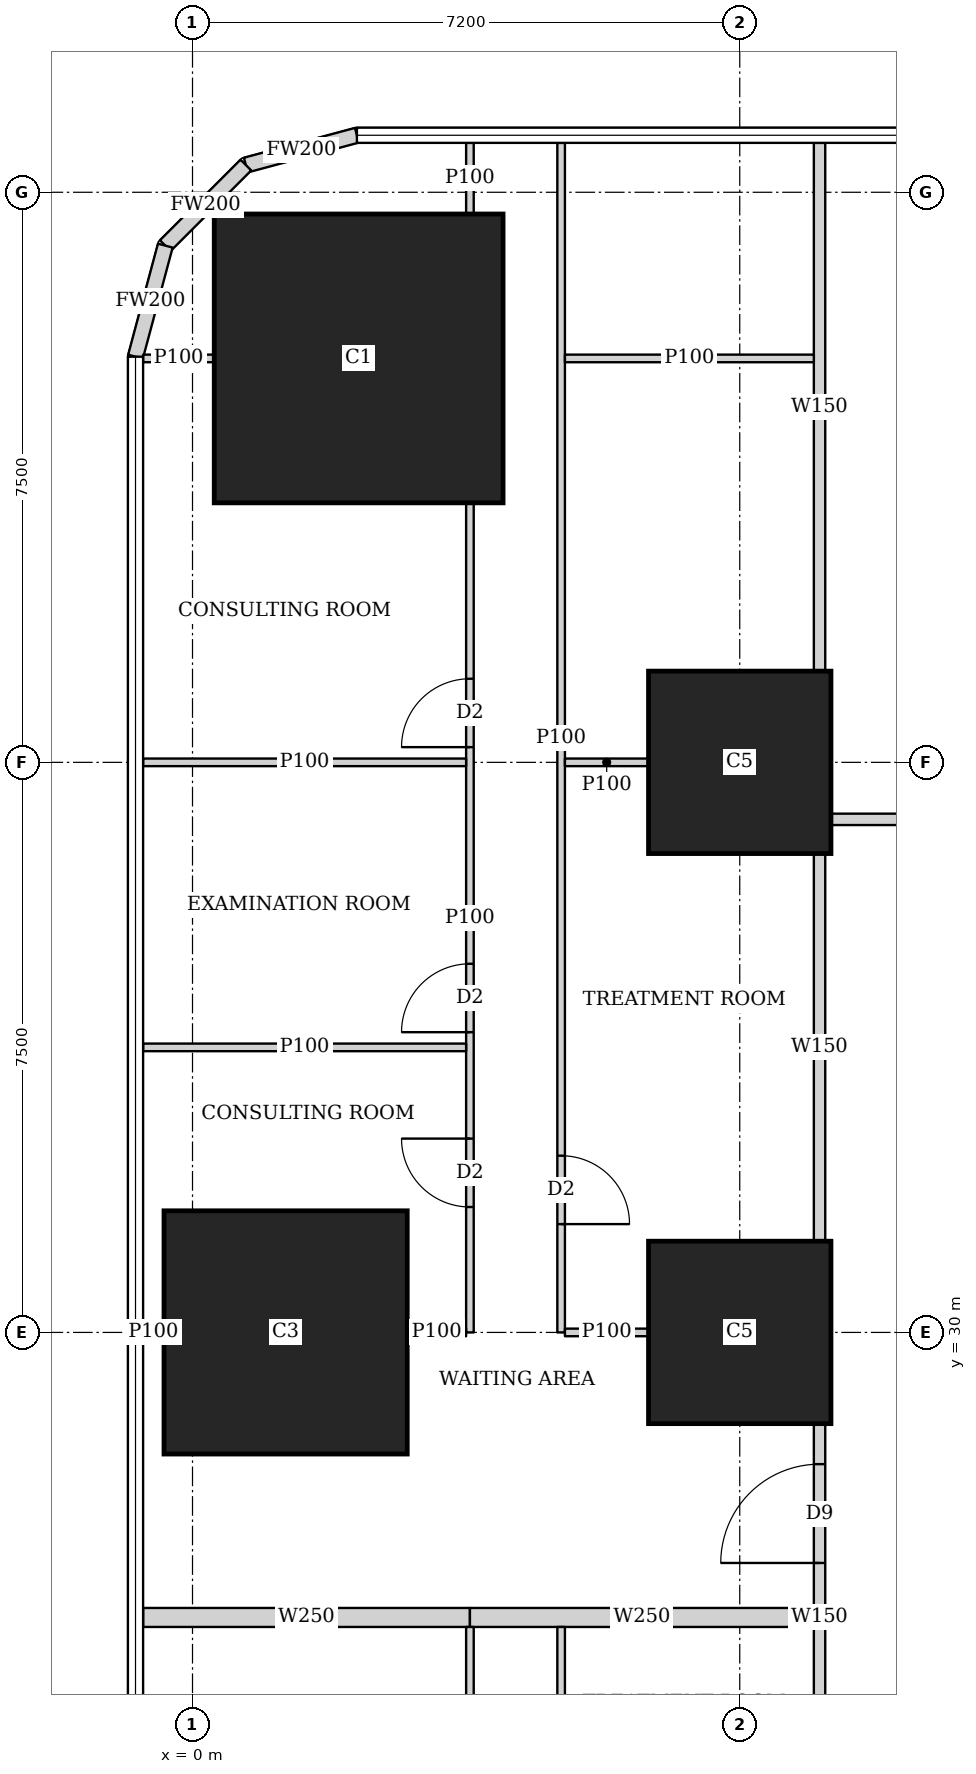
"""IFC4 building model, lengths in metres.
Left out: names, types, materials, properties, quantities, classifications, styles, units other than length and angle.
Written with IfcOpenShell. Run it as: python <this file> out.ifc"""

import sys

from ifc_helpers import new_model, si_unit, direction, frame, frame_2d, origin, origin_2d, place, context, subcontext, project, spatial, rectangle, extrude, element, fill, save


model = new_model("IFC4")
c1 = context("Model", 3, precision=1e-05, world=origin(), true_north=direction((0.0, 1.0)))
c2 = subcontext(c1, "Body", "Model", "MODEL_VIEW")
j1 = project(units=[si_unit("LENGTHUNIT", "METRE"), si_unit("PLANEANGLEUNIT", "RADIAN")], contexts=[c1])
p1 = place(None, origin())
s1 = spatial("IfcSite", under=j1, at=p1, CompositionType="ELEMENT")
p2 = place(p1, origin())
s2 = spatial("IfcBuilding", under=s1, at=p2, CompositionType="ELEMENT")
p3 = place(p2, frame((0.0, 0.0, 5.6)))
s3 = spatial("IfcBuildingStorey", under=s2, at=p3, CompositionType="ELEMENT", Elevation=5.6)
p4 = place(p3, frame((1.225, 30.0, 0.0), z_axis=(0.0, 0.0, 1.0), x_axis=(1.0, 0.0, 0.0)))
e1 = element("IfcColumn", 1, at=p4, inside=s3, PredefinedType="COLUMN", context=c2, shape_type="SweptSolid", body=[
    extrude(rectangle(XDim=3.2, YDim=3.2, at=origin_2d()), origin(), (0.0, 0.0, 1.0), 4.5),
])
for number, where, z_axis, x_axis in (
    (2, (7.2, 30.0, 0.0), (0.0, 0.0, 1.0), (1.0, 0.0, 0.0)),
    (3, (7.2, 37.5, 0.0), (0.0, 0.0, 1.0), (1.0, 0.0, 0.0)),
):
    element("IfcColumn", number, at=place(p3, frame(where, z_axis=z_axis, x_axis=x_axis)), inside=s3, PredefinedType="COLUMN", context=c2, shape_type="SweptSolid", body=[
        extrude(rectangle(XDim=2.4, YDim=2.4, at=origin_2d()), origin(), (0.0, 0.0, 1.0), 4.5),
    ])
p5 = place(p3, frame((2.186, 42.814, 0.0), z_axis=(0.0, 0.0, 1.0), x_axis=(1.0, 0.0, 0.0)))
e4 = element("IfcColumn", 4, at=p5, inside=s3, PredefinedType="COLUMN", context=c2, shape_type="SweptSolid", body=[
    extrude(rectangle(XDim=3.8, YDim=3.8, at=origin_2d()), origin(), (0.0, 0.0, 1.0), 4.5),
])
p6 = place(p3, frame((2.163, 45.75, 0.0), z_axis=(0.0, 0.0, 1.0), x_axis=(-0.965832000415, -0.259168954497, 0.0)))
e5 = element("IfcWall", 5, at=p6, inside=s3, PredefinedType="SOLIDWALL", context=c2, shape_type="SweptSolid", body=[
    extrude(rectangle(XDim=1.513, YDim=0.2, at=frame_2d((0.756, 0.0))), origin(), (0.0, 0.0, 1.0), 4.2),
])
p7 = place(p3, frame((0.702, 45.358, 0.0), z_axis=(0.0, 0.0, 1.0), x_axis=(-0.707106781187, -0.707106781187, 0.0)))
e6 = element("IfcWall", 6, at=p7, inside=s3, PredefinedType="SOLIDWALL", context=c2, shape_type="SweptSolid", body=[
    extrude(rectangle(XDim=1.499, YDim=0.2, at=frame_2d((0.75, 0.0))), origin(), (0.0, 0.0, 1.0), 4.2),
])
p8 = place(p3, frame((-0.358, 44.298, 0.0), z_axis=(0.0, 0.0, 1.0), x_axis=(-0.259168954497, -0.965832000415, 0.0)))
e7 = element("IfcWall", 7, at=p8, inside=s3, PredefinedType="SOLIDWALL", context=c2, shape_type="SweptSolid", body=[
    extrude(rectangle(XDim=1.513, YDim=0.2, at=frame_2d((0.756, 0.0))), origin(), (0.0, 0.0, 1.0), 4.2),
])
p9 = place(p3, frame((8.25, 23.701, 0.0), z_axis=(0.0, 0.0, 1.0), x_axis=(0.0, 1.0, 0.0)))
e8 = element("IfcWall", 8, at=p9, inside=s3, PredefinedType="SOLIDWALL", context=c2, shape_type="SweptSolid", body=[
    extrude(rectangle(XDim=5.098, YDim=0.15, at=frame_2d((2.549, 0.0))), origin(), (0.0, 0.0, 1.0), 4.2),
])
p10 = place(p9, frame((3.266, 0.0, 0.0)))
e9 = element("IfcOpeningElement", 9, at=p10, cuts=e8, PredefinedType="OPENING", context=c2, shape_type="SweptSolid", body=[
    extrude(rectangle(XDim=1.3, YDim=2.1, at=frame_2d((0.65, 1.05))), frame((0.0, 0.085, 0.0), z_axis=(0.0, -1.0, 0.0), x_axis=(1.0, 0.0, 0.0)), (0.0, 0.0, 1.0), 0.17),
])
p11 = place(p3, frame((8.25, 31.201, 0.0), z_axis=(0.0, 0.0, 1.0), x_axis=(0.0, 1.0, 0.0)))
e10 = element("IfcWall", 10, at=p11, inside=s3, PredefinedType="SOLIDWALL", context=c2, shape_type="SweptSolid", body=[
    extrude(rectangle(XDim=5.098, YDim=0.15, at=frame_2d((2.549, 0.0))), origin(), (0.0, 0.0, 1.0), 4.2),
])
p12 = place(p3, frame((8.25, 38.701, 0.0), z_axis=(0.0, 0.0, 1.0), x_axis=(0.0, 1.0, 0.0)))
e11 = element("IfcWall", 11, at=p12, inside=s3, PredefinedType="SOLIDWALL", context=c2, shape_type="SweptSolid", body=[
    extrude(rectangle(XDim=6.949, YDim=0.15, at=frame_2d((3.475, 0.0))), origin(), (0.0, 0.0, 1.0), 2.4),
])
p13 = place(p3, frame((8.401, 36.75, 0.0), z_axis=(0.0, 0.0, 1.0), x_axis=(1.0, 0.0, 0.0)))
e12 = element("IfcWall", 12, at=p13, inside=s3, PredefinedType="SOLIDWALL", context=c2, shape_type="SweptSolid", body=[
    extrude(rectangle(XDim=4.798, YDim=0.15, at=frame_2d((2.399, 0.0))), origin(), (0.0, 0.0, 1.0), 2.6),
])
p14 = place(p13, frame((2.274, 0.0, 0.0)))
e13 = element("IfcOpeningElement", 13, at=p14, cuts=e12, PredefinedType="OPENING", context=c2, shape_type="SweptSolid", body=[
    extrude(rectangle(XDim=1.3, YDim=2.1, at=frame_2d((0.65, 1.05))), frame((0.0, 0.085, 0.0), z_axis=(0.0, -1.0, 0.0), x_axis=(1.0, 0.0, 0.0)), (0.0, 0.0, 1.0), 0.17),
])
p15 = place(p3, frame((3.65, 15.0, 0.0), z_axis=(0.0, 0.0, 1.0), x_axis=(0.0, 1.0, 0.0)))
e14 = element("IfcWall", 14, at=p15, inside=s3, PredefinedType="PARTITIONING", context=c2, shape_type="SweptSolid", body=[
    extrude(rectangle(XDim=11.125, YDim=0.1, at=frame_2d((5.562, 0.0))), origin(), (0.0, 0.0, 1.0), 2.6),
])
p16 = place(p15, frame((1.65, 0.0, 0.0)))
e15 = element("IfcOpeningElement", 15, at=p16, cuts=e14, PredefinedType="OPENING", context=c2, shape_type="SweptSolid", body=[
    extrude(rectangle(XDim=0.9, YDim=2.1, at=frame_2d((0.45, 1.05))), frame((0.0, 0.06, 0.0), z_axis=(0.0, -1.0, 0.0), x_axis=(1.0, 0.0, 0.0)), (0.0, 0.0, 1.0), 0.12),
])
p17 = place(p15, frame((3.95, 0.0, 0.0)))
e16 = element("IfcOpeningElement", 16, at=p17, cuts=e14, PredefinedType="OPENING", context=c2, shape_type="SweptSolid", body=[
    extrude(rectangle(XDim=0.9, YDim=2.1, at=frame_2d((0.45, 1.05))), frame((0.0, 0.06, 0.0), z_axis=(0.0, -1.0, 0.0), x_axis=(1.0, 0.0, 0.0)), (0.0, 0.0, 1.0), 0.12),
])
p18 = place(p15, frame((7.7, 0.0, 0.0)))
e17 = element("IfcOpeningElement", 17, at=p18, cuts=e14, PredefinedType="OPENING", context=c2, shape_type="SweptSolid", body=[
    extrude(rectangle(XDim=0.9, YDim=2.1, at=frame_2d((0.45, 1.05))), frame((0.0, 0.06, 0.0), z_axis=(0.0, -1.0, 0.0), x_axis=(1.0, 0.0, 0.0)), (0.0, 0.0, 1.0), 0.12),
])
p19 = place(p3, frame((4.85, 15.0, 0.0), z_axis=(0.0, 0.0, 1.0), x_axis=(0.0, 1.0, 0.0)))
e18 = element("IfcWall", 18, at=p19, inside=s3, PredefinedType="PARTITIONING", context=c2, shape_type="SweptSolid", body=[
    extrude(rectangle(XDim=11.125, YDim=0.1, at=frame_2d((5.562, 0.0))), origin(), (0.0, 0.0, 1.0), 2.6),
])
p20 = place(p19, frame((1.425, 0.0, 0.0)))
e19 = element("IfcOpeningElement", 19, at=p20, cuts=e18, PredefinedType="OPENING", context=c2, shape_type="SweptSolid", body=[
    extrude(rectangle(XDim=0.9, YDim=2.1, at=frame_2d((0.45, 1.05))), frame((0.0, 0.06, 0.0), z_axis=(0.0, -1.0, 0.0), x_axis=(1.0, 0.0, 0.0)), (0.0, 0.0, 1.0), 0.12),
])
p21 = place(p19, frame((5.175, 0.0, 0.0)))
e20 = element("IfcOpeningElement", 20, at=p21, cuts=e18, PredefinedType="OPENING", context=c2, shape_type="SweptSolid", body=[
    extrude(rectangle(XDim=0.9, YDim=2.1, at=frame_2d((0.45, 1.05))), frame((0.0, 0.06, 0.0), z_axis=(0.0, -1.0, 0.0), x_axis=(1.0, 0.0, 0.0)), (0.0, 0.0, 1.0), 0.12),
])
p22 = place(p19, frame((8.925, 0.0, 0.0)))
e21 = element("IfcOpeningElement", 21, at=p22, cuts=e18, PredefinedType="OPENING", context=c2, shape_type="SweptSolid", body=[
    extrude(rectangle(XDim=0.9, YDim=2.1, at=frame_2d((0.45, 1.05))), frame((0.0, 0.06, 0.0), z_axis=(0.0, -1.0, 0.0), x_axis=(1.0, 0.0, 0.0)), (0.0, 0.0, 1.0), 0.12),
])
p23 = place(p3, frame((3.65, 30.0, 0.0), z_axis=(0.0, 0.0, 1.0), x_axis=(0.0, 1.0, 0.0)))
e22 = element("IfcWall", 22, at=p23, inside=s3, PredefinedType="PARTITIONING", context=c2, shape_type="SweptSolid", body=[
    extrude(rectangle(XDim=10.913, YDim=0.1, at=frame_2d((5.457, 0.0))), origin(), (0.0, 0.0, 1.0), 2.6),
])
p24 = place(p23, frame((1.65, 0.0, 0.0)))
e23 = element("IfcOpeningElement", 23, at=p24, cuts=e22, PredefinedType="OPENING", context=c2, shape_type="SweptSolid", body=[
    extrude(rectangle(XDim=0.9, YDim=2.1, at=frame_2d((0.45, 1.05))), frame((0.0, 0.06, 0.0), z_axis=(0.0, -1.0, 0.0), x_axis=(1.0, 0.0, 0.0)), (0.0, 0.0, 1.0), 0.12),
])
p25 = place(p23, frame((3.95, 0.0, 0.0)))
e24 = element("IfcOpeningElement", 24, at=p25, cuts=e22, PredefinedType="OPENING", context=c2, shape_type="SweptSolid", body=[
    extrude(rectangle(XDim=0.9, YDim=2.1, at=frame_2d((0.45, 1.05))), frame((0.0, 0.06, 0.0), z_axis=(0.0, -1.0, 0.0), x_axis=(1.0, 0.0, 0.0)), (0.0, 0.0, 1.0), 0.12),
])
p26 = place(p23, frame((7.7, 0.0, 0.0)))
e25 = element("IfcOpeningElement", 25, at=p26, cuts=e22, PredefinedType="OPENING", context=c2, shape_type="SweptSolid", body=[
    extrude(rectangle(XDim=0.9, YDim=2.1, at=frame_2d((0.45, 1.05))), frame((0.0, 0.06, 0.0), z_axis=(0.0, -1.0, 0.0), x_axis=(1.0, 0.0, 0.0)), (0.0, 0.0, 1.0), 0.12),
])
p27 = place(p3, frame((3.65, 44.715, 0.0), z_axis=(0.0, 0.0, 1.0), x_axis=(0.0, 1.0, 0.0)))
e26 = element("IfcWall", 26, at=p27, inside=s3, PredefinedType="PARTITIONING", context=c2, shape_type="SweptSolid", body=[
    extrude(rectangle(XDim=0.935, YDim=0.1, at=frame_2d((0.467, 0.0))), origin(), (0.0, 0.0, 1.0), 4.2),
])
p28 = place(p3, frame((4.85, 30.0, 0.0), z_axis=(0.0, 0.0, 1.0), x_axis=(0.0, 1.0, 0.0)))
e27 = element("IfcWall", 27, at=p28, inside=s3, PredefinedType="PARTITIONING", context=c2, shape_type="SweptSolid", body=[
    extrude(rectangle(XDim=15.65, YDim=0.1, at=frame_2d((7.825, 0.0))), origin(), (0.0, 0.0, 1.0), 2.4),
])
p29 = place(p28, frame((1.425, 0.0, 0.0)))
e28 = element("IfcOpeningElement", 28, at=p29, cuts=e27, PredefinedType="OPENING", context=c2, shape_type="SweptSolid", body=[
    extrude(rectangle(XDim=0.9, YDim=2.1, at=frame_2d((0.45, 1.05))), frame((0.0, 0.06, 0.0), z_axis=(0.0, -1.0, 0.0), x_axis=(1.0, 0.0, 0.0)), (0.0, 0.0, 1.0), 0.12),
])
p30 = place(p3, frame((-0.65, 30.0, 0.0), z_axis=(0.0, 0.0, 1.0), x_axis=(1.0, 0.0, 0.0)))
e29 = element("IfcWall", 29, at=p30, inside=s3, PredefinedType="PARTITIONING", context=c2, shape_type="SweptSolid", body=[
    extrude(rectangle(XDim=0.274, YDim=0.1, at=frame_2d((0.137, 0.0))), origin(), (0.0, 0.0, 1.0), 4.2),
])
p31 = place(p3, frame((2.826, 30.0, 0.0), z_axis=(0.0, 0.0, 1.0), x_axis=(1.0, 0.0, 0.0)))
e30 = element("IfcWall", 30, at=p31, inside=s3, PredefinedType="PARTITIONING", context=c2, shape_type="SweptSolid", body=[
    extrude(rectangle(XDim=0.774, YDim=0.1, at=frame_2d((0.387, 0.0))), origin(), (0.0, 0.0, 1.0), 2.6),
])
for number, where, z_axis, x_axis in (
    (31, (-0.65, 33.75, 0.0), (0.0, 0.0, 1.0), (1.0, 0.0, 0.0)),
    (32, (-0.65, 37.5, 0.0), (0.0, 0.0, 1.0), (1.0, 0.0, 0.0)),
):
    element("IfcWall", number, at=place(p3, frame(where, z_axis=z_axis, x_axis=x_axis)), inside=s3, PredefinedType="PARTITIONING", context=c2, shape_type="SweptSolid", body=[
        extrude(rectangle(XDim=4.25, YDim=0.1, at=frame_2d((2.125, 0.0))), origin(), (0.0, 0.0, 1.0), 2.4),
    ])
p32 = place(p3, frame((-0.65, 42.814, 0.0), z_axis=(0.0, 0.0, 1.0), x_axis=(1.0, 0.0, 0.0)))
e33 = element("IfcWall", 33, at=p32, inside=s3, PredefinedType="PARTITIONING", context=c2, shape_type="SweptSolid", body=[
    extrude(rectangle(XDim=0.935, YDim=0.1, at=frame_2d((0.467, 0.0))), origin(), (0.0, 0.0, 1.0), 4.2),
])
p33 = place(p3, frame((4.9, 30.0, 0.0), z_axis=(0.0, 0.0, 1.0), x_axis=(1.0, 0.0, 0.0)))
e34 = element("IfcWall", 34, at=p33, inside=s3, PredefinedType="PARTITIONING", context=c2, shape_type="SweptSolid", body=[
    extrude(rectangle(XDim=1.099, YDim=0.1, at=frame_2d((0.55, 0.0))), origin(), (0.0, 0.0, 1.0), 2.6),
])
p34 = place(p3, frame((4.9, 37.5, 0.0), z_axis=(0.0, 0.0, 1.0), x_axis=(1.0, 0.0, 0.0)))
e35 = element("IfcWall", 35, at=p34, inside=s3, PredefinedType="PARTITIONING", context=c2, shape_type="SweptSolid", body=[
    extrude(rectangle(XDim=1.099, YDim=0.1, at=frame_2d((0.55, 0.0))), origin(), (0.0, 0.0, 1.0), 4.2),
])
p35 = place(p3, frame((4.9, 42.814, 0.0), z_axis=(0.0, 0.0, 1.0), x_axis=(1.0, 0.0, 0.0)))
e36 = element("IfcWall", 36, at=p35, inside=s3, PredefinedType="PARTITIONING", context=c2, shape_type="SweptSolid", body=[
    extrude(rectangle(XDim=3.275, YDim=0.1, at=frame_2d((1.638, 0.0))), origin(), (0.0, 0.0, 1.0), 2.4),
])
p36 = place(p3, frame((-0.65, 26.25, 0.0), z_axis=(0.0, 0.0, 1.0), x_axis=(1.0, 0.0, 0.0)))
e37 = element("IfcWall", 37, at=p36, inside=s3, PredefinedType="SOLIDWALL", context=c2, shape_type="SweptSolid", body=[
    extrude(rectangle(XDim=4.3, YDim=0.25, at=frame_2d((2.15, 0.0))), origin(), (0.0, 0.0, 1.0), 2.4),
])
p37 = place(p3, frame((3.65, 26.25, 0.0), z_axis=(0.0, 0.0, 1.0), x_axis=(1.0, 0.0, 0.0)))
e38 = element("IfcWall", 38, at=p37, inside=s3, PredefinedType="SOLIDWALL", context=c2, shape_type="SweptSolid", body=[
    extrude(rectangle(XDim=4.525, YDim=0.25, at=frame_2d((2.263, 0.0))), origin(), (0.0, 0.0, 1.0), 2.6),
])
p38 = place(p24, origin())
e39 = element("IfcDoor", 39, at=p38, inside=s3, OperationType="SINGLE_SWING_RIGHT", PredefinedType="DOOR", context=c2, shape_type="SweptSolid", body=[
    extrude(rectangle(XDim=0.9, YDim=2.1, at=frame_2d((0.45, 1.05))), frame((0.0, 0.025, 0.0), z_axis=(0.0, -1.0, 0.0), x_axis=(1.0, 0.0, 0.0)), (0.0, 0.0, 1.0), 0.05),
])
fill(e23, e39)
p39 = place(p25, origin())
e40 = element("IfcDoor", 40, at=p39, inside=s3, OperationType="SINGLE_SWING_LEFT", PredefinedType="DOOR", context=c2, shape_type="SweptSolid", body=[
    extrude(rectangle(XDim=0.9, YDim=2.1, at=frame_2d((0.45, 1.05))), frame((0.0, 0.025, 0.0), z_axis=(0.0, -1.0, 0.0), x_axis=(1.0, 0.0, 0.0)), (0.0, 0.0, 1.0), 0.05),
])
fill(e24, e40)
p40 = place(p26, origin())
e41 = element("IfcDoor", 41, at=p40, inside=s3, OperationType="SINGLE_SWING_LEFT", PredefinedType="DOOR", context=c2, shape_type="SweptSolid", body=[
    extrude(rectangle(XDim=0.9, YDim=2.1, at=frame_2d((0.45, 1.05))), frame((0.0, 0.025, 0.0), z_axis=(0.0, -1.0, 0.0), x_axis=(1.0, 0.0, 0.0)), (0.0, 0.0, 1.0), 0.05),
])
fill(e25, e41)
p41 = place(p29, origin())
e42 = element("IfcDoor", 42, at=p41, inside=s3, OperationType="SINGLE_SWING_RIGHT", PredefinedType="DOOR", context=c2, shape_type="SweptSolid", body=[
    extrude(rectangle(XDim=0.9, YDim=2.1, at=frame_2d((0.45, 1.05))), frame((0.0, 0.025, 0.0), z_axis=(0.0, -1.0, 0.0), x_axis=(1.0, 0.0, 0.0)), (0.0, 0.0, 1.0), 0.05),
])
fill(e28, e42)
p42 = place(p10, origin())
e43 = element("IfcDoor", 43, at=p42, inside=s3, OperationType="DOUBLE_DOOR_SINGLE_SWING", PredefinedType="DOOR", context=c2, shape_type="SweptSolid", body=[
    extrude(rectangle(XDim=1.3, YDim=2.1, at=frame_2d((0.65, 1.05))), frame((0.0, 0.025, 0.0), z_axis=(0.0, -1.0, 0.0), x_axis=(1.0, 0.0, 0.0)), (0.0, 0.0, 1.0), 0.05),
])
fill(e9, e43)
save(model, sys.argv[1])
